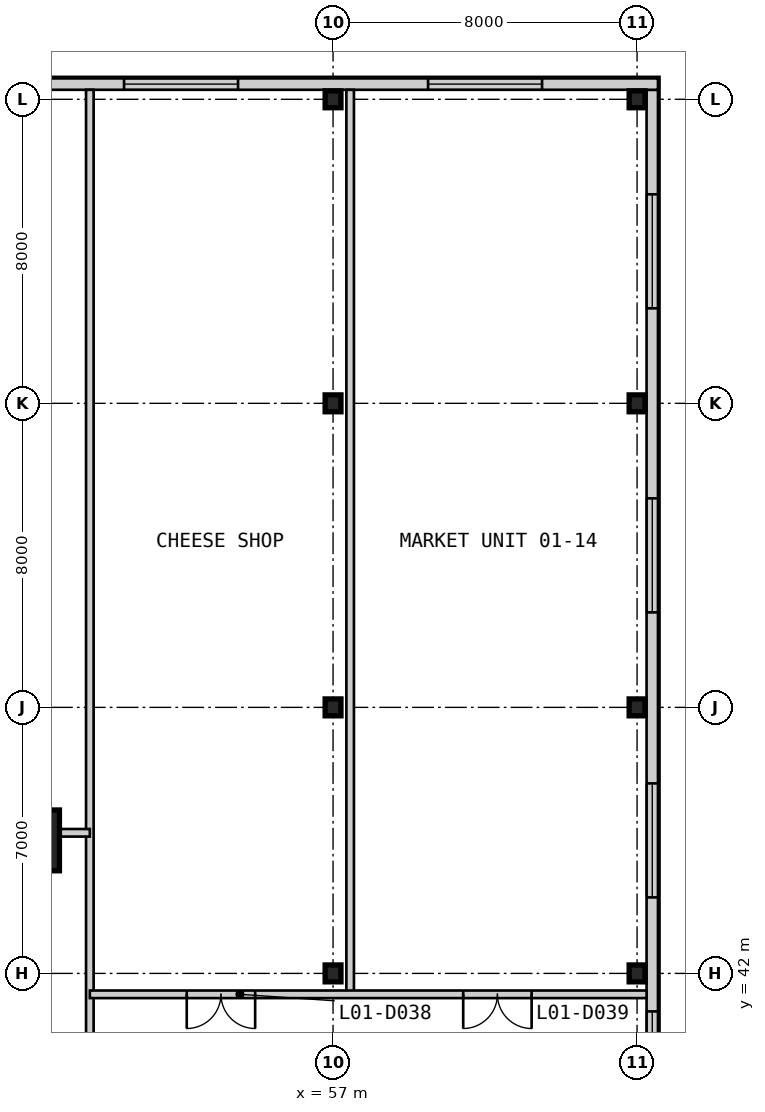
"""IFC4 building model, lengths in metres.
Left out: names, types, materials, properties, quantities, classifications, styles, units other than length and angle.
Written with IfcOpenShell. Run it as: python <this file> out.ifc"""

import sys

from ifc_helpers import new_model, si_unit, direction, frame, frame_2d, origin, origin_2d, place, context, subcontext, project, spatial, rectangle, i_section, extrude, element, fill, save


model = new_model("IFC4")
c1 = context("Model", 3, precision=1e-05, world=origin(), true_north=direction((0.0, 1.0)))
c2 = subcontext(c1, "Body", "Model", "MODEL_VIEW")
j1 = project(units=[si_unit("LENGTHUNIT", "METRE"), si_unit("PLANEANGLEUNIT", "RADIAN")], contexts=[c1])
p1 = place(None, origin())
s1 = spatial("IfcSite", under=j1, at=p1, CompositionType="ELEMENT")
p2 = place(p1, origin())
s2 = spatial("IfcBuilding", under=s1, at=p2, CompositionType="ELEMENT")
p3 = place(p2, frame((0.0, 0.0, 7.0)))
s3 = spatial("IfcBuildingStorey", under=s2, at=p3, CompositionType="ELEMENT", Elevation=7.0)
p4 = place(p3, frame((49.0, 45.5, 0.0), z_axis=(0.0, 0.0, 1.0), x_axis=(1.0, 0.0, 0.0)))
e1 = element("IfcColumn", 1, at=p4, inside=s3, PredefinedType="COLUMN", context=c2, shape_type="SweptSolid", body=[
    extrude(rectangle(XDim=1.6, YDim=1.6, at=origin_2d()), origin(), (0.0, 0.0, 1.0), 4.8),
])
for number, where, z_axis, x_axis in (
    (2, (57.0, 42.0, 0.0), (0.0, 0.0, 1.0), (1.0, 0.0, 0.0)),
    (3, (57.0, 49.0, 0.0), (0.0, 0.0, 1.0), (1.0, 0.0, 0.0)),
    (4, (57.0, 57.0, 0.0), (0.0, 0.0, 1.0), (1.0, 0.0, 0.0)),
    (5, (57.0, 65.0, 0.0), (0.0, 0.0, 1.0), (1.0, 0.0, 0.0)),
    (6, (65.0, 42.0, 0.0), (0.0, 0.0, 1.0), (1.0, 0.0, 0.0)),
    (7, (65.0, 49.0, 0.0), (0.0, 0.0, 1.0), (1.0, 0.0, 0.0)),
    (8, (65.0, 57.0, 0.0), (0.0, 0.0, 1.0), (1.0, 0.0, 0.0)),
    (9, (65.0, 65.0, 0.0), (0.0, 0.0, 1.0), (1.0, 0.0, 0.0)),
):
    element("IfcColumn", number, at=place(p3, frame(where, z_axis=z_axis, x_axis=x_axis)), inside=s3, PredefinedType="COLUMN", context=c2, shape_type="SweptSolid", body=[
        extrude(i_section(OverallWidth=0.417, OverallDepth=0.445, WebThickness=0.039, FlangeThickness=0.063, at=origin_2d()), origin(), (0.0, 0.0, 1.0), 4.8),
    ])
p5 = place(p3, frame((65.4, -15.25, 0.0), z_axis=(0.0, 0.0, 1.0), x_axis=(0.0, 1.0, 0.0)))
e10 = element("IfcWall", 10, at=p5, inside=s3, PredefinedType="SOLIDWALL", context=c2, shape_type="SweptSolid", body=[
    extrude(rectangle(XDim=80.5, YDim=0.3, at=frame_2d((40.25, 0.0))), origin(), (0.0, 0.0, 1.0), 4.5),
])
p6 = place(p5, frame((2.75, 0.0, 0.9)))
e11 = element("IfcOpeningElement", 11, at=p6, cuts=e10, PredefinedType="OPENING", context=c2, shape_type="SweptSolid", body=[
    extrude(rectangle(XDim=3.0, YDim=2.4, at=frame_2d((1.5, 1.2))), frame((0.0, 0.16, 0.0), z_axis=(0.0, -1.0, 0.0), x_axis=(1.0, 0.0, 0.0)), (0.0, 0.0, 1.0), 0.32),
])
p7 = place(p5, frame((10.75, 0.0, 0.9)))
e12 = element("IfcOpeningElement", 12, at=p7, cuts=e10, PredefinedType="OPENING", context=c2, shape_type="SweptSolid", body=[
    extrude(rectangle(XDim=3.0, YDim=2.4, at=frame_2d((1.5, 1.2))), frame((0.0, 0.16, 0.0), z_axis=(0.0, -1.0, 0.0), x_axis=(1.0, 0.0, 0.0)), (0.0, 0.0, 1.0), 0.32),
])
p8 = place(p5, frame((18.75, 0.0, 0.9)))
e13 = element("IfcOpeningElement", 13, at=p8, cuts=e10, PredefinedType="OPENING", context=c2, shape_type="SweptSolid", body=[
    extrude(rectangle(XDim=3.0, YDim=2.4, at=frame_2d((1.5, 1.2))), frame((0.0, 0.16, 0.0), z_axis=(0.0, -1.0, 0.0), x_axis=(1.0, 0.0, 0.0)), (0.0, 0.0, 1.0), 0.32),
])
p9 = place(p5, frame((32.75, 0.0, 0.9)))
e14 = element("IfcOpeningElement", 14, at=p9, cuts=e10, PredefinedType="OPENING", context=c2, shape_type="SweptSolid", body=[
    extrude(rectangle(XDim=3.0, YDim=2.4, at=frame_2d((1.5, 1.2))), frame((0.0, 0.16, 0.0), z_axis=(0.0, -1.0, 0.0), x_axis=(1.0, 0.0, 0.0)), (0.0, 0.0, 1.0), 0.32),
])
p10 = place(p5, frame((44.75, 0.0, 0.9)))
e15 = element("IfcOpeningElement", 15, at=p10, cuts=e10, PredefinedType="OPENING", context=c2, shape_type="SweptSolid", body=[
    extrude(rectangle(XDim=3.0, YDim=2.4, at=frame_2d((1.5, 1.2))), frame((0.0, 0.16, 0.0), z_axis=(0.0, -1.0, 0.0), x_axis=(1.0, 0.0, 0.0)), (0.0, 0.0, 1.0), 0.32),
])
p11 = place(p5, frame((53.25, 0.0, 0.9)))
e16 = element("IfcOpeningElement", 16, at=p11, cuts=e10, PredefinedType="OPENING", context=c2, shape_type="SweptSolid", body=[
    extrude(rectangle(XDim=3.0, YDim=2.4, at=frame_2d((1.5, 1.2))), frame((0.0, 0.16, 0.0), z_axis=(0.0, -1.0, 0.0), x_axis=(1.0, 0.0, 0.0)), (0.0, 0.0, 1.0), 0.32),
])
p12 = place(p5, frame((59.25, 0.0, 0.9)))
e17 = element("IfcOpeningElement", 17, at=p12, cuts=e10, PredefinedType="OPENING", context=c2, shape_type="SweptSolid", body=[
    extrude(rectangle(XDim=3.0, YDim=2.4, at=frame_2d((1.5, 1.2))), frame((0.0, 0.16, 0.0), z_axis=(0.0, -1.0, 0.0), x_axis=(1.0, 0.0, 0.0)), (0.0, 0.0, 1.0), 0.32),
])
p13 = place(p5, frame((66.75, 0.0, 0.9)))
e18 = element("IfcOpeningElement", 18, at=p13, cuts=e10, PredefinedType="OPENING", context=c2, shape_type="SweptSolid", body=[
    extrude(rectangle(XDim=3.0, YDim=2.4, at=frame_2d((1.5, 1.2))), frame((0.0, 0.16, 0.0), z_axis=(0.0, -1.0, 0.0), x_axis=(1.0, 0.0, 0.0)), (0.0, 0.0, 1.0), 0.32),
])
p14 = place(p5, frame((74.75, 0.0, 0.9)))
e19 = element("IfcOpeningElement", 19, at=p14, cuts=e10, PredefinedType="OPENING", context=c2, shape_type="SweptSolid", body=[
    extrude(rectangle(XDim=3.0, YDim=2.4, at=frame_2d((1.5, 1.2))), frame((0.0, 0.16, 0.0), z_axis=(0.0, -1.0, 0.0), x_axis=(1.0, 0.0, 0.0)), (0.0, 0.0, 1.0), 0.32),
])
p15 = place(p3, frame((65.55, 65.4, 0.0), z_axis=(0.0, 0.0, 1.0), x_axis=(-1.0, 0.0, 0.0)))
e20 = element("IfcWall", 20, at=p15, inside=s3, PredefinedType="SOLIDWALL", context=c2, shape_type="SweptSolid", body=[
    extrude(rectangle(XDim=81.1, YDim=0.3, at=frame_2d((40.55, 0.0))), origin(), (0.0, 0.0, 1.0), 4.5),
])
p16 = place(p15, frame((75.05, 0.0, 0.9)))
e21 = element("IfcOpeningElement", 21, at=p16, cuts=e20, PredefinedType="OPENING", context=c2, shape_type="SweptSolid", body=[
    extrude(rectangle(XDim=3.0, YDim=2.4, at=frame_2d((1.5, 1.2))), frame((0.0, 0.16, 0.0), z_axis=(0.0, -1.0, 0.0), x_axis=(1.0, 0.0, 0.0)), (0.0, 0.0, 1.0), 0.32),
])
p17 = place(p15, frame((67.05, 0.0, 0.9)))
e22 = element("IfcOpeningElement", 22, at=p17, cuts=e20, PredefinedType="OPENING", context=c2, shape_type="SweptSolid", body=[
    extrude(rectangle(XDim=3.0, YDim=2.4, at=frame_2d((1.5, 1.2))), frame((0.0, 0.16, 0.0), z_axis=(0.0, -1.0, 0.0), x_axis=(1.0, 0.0, 0.0)), (0.0, 0.0, 1.0), 0.32),
])
p18 = place(p15, frame((59.05, 0.0, 0.9)))
e23 = element("IfcOpeningElement", 23, at=p18, cuts=e20, PredefinedType="OPENING", context=c2, shape_type="SweptSolid", body=[
    extrude(rectangle(XDim=3.0, YDim=2.4, at=frame_2d((1.5, 1.2))), frame((0.0, 0.16, 0.0), z_axis=(0.0, -1.0, 0.0), x_axis=(1.0, 0.0, 0.0)), (0.0, 0.0, 1.0), 0.32),
])
p19 = place(p15, frame((45.05, 0.0, 0.9)))
e24 = element("IfcOpeningElement", 24, at=p19, cuts=e20, PredefinedType="OPENING", context=c2, shape_type="SweptSolid", body=[
    extrude(rectangle(XDim=3.0, YDim=2.4, at=frame_2d((1.5, 1.2))), frame((0.0, 0.16, 0.0), z_axis=(0.0, -1.0, 0.0), x_axis=(1.0, 0.0, 0.0)), (0.0, 0.0, 1.0), 0.32),
])
p20 = place(p15, frame((33.05, 0.0, 0.9)))
e25 = element("IfcOpeningElement", 25, at=p20, cuts=e20, PredefinedType="OPENING", context=c2, shape_type="SweptSolid", body=[
    extrude(rectangle(XDim=3.0, YDim=2.4, at=frame_2d((1.5, 1.2))), frame((0.0, 0.16, 0.0), z_axis=(0.0, -1.0, 0.0), x_axis=(1.0, 0.0, 0.0)), (0.0, 0.0, 1.0), 0.32),
])
p21 = place(p15, frame((24.55, 0.0, 0.9)))
e26 = element("IfcOpeningElement", 26, at=p21, cuts=e20, PredefinedType="OPENING", context=c2, shape_type="SweptSolid", body=[
    extrude(rectangle(XDim=3.0, YDim=2.4, at=frame_2d((1.5, 1.2))), frame((0.0, 0.16, 0.0), z_axis=(0.0, -1.0, 0.0), x_axis=(1.0, 0.0, 0.0)), (0.0, 0.0, 1.0), 0.32),
])
p22 = place(p15, frame((18.55, 0.0, 0.9)))
e27 = element("IfcOpeningElement", 27, at=p22, cuts=e20, PredefinedType="OPENING", context=c2, shape_type="SweptSolid", body=[
    extrude(rectangle(XDim=3.0, YDim=2.4, at=frame_2d((1.5, 1.2))), frame((0.0, 0.16, 0.0), z_axis=(0.0, -1.0, 0.0), x_axis=(1.0, 0.0, 0.0)), (0.0, 0.0, 1.0), 0.32),
])
p23 = place(p15, frame((11.05, 0.0, 0.9)))
e28 = element("IfcOpeningElement", 28, at=p23, cuts=e20, PredefinedType="OPENING", context=c2, shape_type="SweptSolid", body=[
    extrude(rectangle(XDim=3.0, YDim=2.4, at=frame_2d((1.5, 1.2))), frame((0.0, 0.16, 0.0), z_axis=(0.0, -1.0, 0.0), x_axis=(1.0, 0.0, 0.0)), (0.0, 0.0, 1.0), 0.32),
])
p24 = place(p15, frame((3.05, 0.0, 0.9)))
e29 = element("IfcOpeningElement", 29, at=p24, cuts=e20, PredefinedType="OPENING", context=c2, shape_type="SweptSolid", body=[
    extrude(rectangle(XDim=3.0, YDim=2.4, at=frame_2d((1.5, 1.2))), frame((0.0, 0.16, 0.0), z_axis=(0.0, -1.0, 0.0), x_axis=(1.0, 0.0, 0.0)), (0.0, 0.0, 1.0), 0.32),
])
p25 = place(p3, frame((50.6, 38.4, 0.0), z_axis=(0.0, 0.0, 1.0), x_axis=(0.0, 1.0, 0.0)))
e30 = element("IfcWall", 30, at=p25, inside=s3, PredefinedType="PARTITIONING", context=c2, shape_type="SweptSolid", body=[
    extrude(rectangle(XDim=26.85, YDim=0.2, at=frame_2d((13.425, 0.0))), origin(), (0.0, 0.0, 1.0), 4.5),
])
p26 = place(p3, frame((57.45, 41.45, 0.0), z_axis=(0.0, 0.0, 1.0), x_axis=(0.0, 1.0, 0.0)))
e31 = element("IfcWall", 31, at=p26, inside=s3, PredefinedType="PARTITIONING", context=c2, shape_type="SweptSolid", body=[
    extrude(rectangle(XDim=23.8, YDim=0.2, at=frame_2d((11.9, 0.0))), origin(), (0.0, 0.0, 1.0), 4.5),
])
p27 = place(p3, frame((50.6, 41.45, 0.0), z_axis=(0.0, 0.0, 1.0), x_axis=(1.0, 0.0, 0.0)))
e32 = element("IfcWall", 32, at=p27, inside=s3, PredefinedType="PARTITIONING", context=c2, shape_type="SweptSolid", body=[
    extrude(rectangle(XDim=14.65, YDim=0.2, at=frame_2d((7.325, 0.0))), origin(), (0.0, 0.0, 1.0), 4.5),
])
p28 = place(p27, frame((2.55, 0.0, 0.0)))
e33 = element("IfcOpeningElement", 33, at=p28, cuts=e32, PredefinedType="OPENING", context=c2, shape_type="SweptSolid", body=[
    extrude(rectangle(XDim=1.8, YDim=2.4, at=frame_2d((0.9, 1.2))), frame((0.0, 0.11, 0.0), z_axis=(0.0, -1.0, 0.0), x_axis=(1.0, 0.0, 0.0)), (0.0, 0.0, 1.0), 0.22),
])
p29 = place(p27, frame((9.825, 0.0, 0.0)))
e34 = element("IfcOpeningElement", 34, at=p29, cuts=e32, PredefinedType="OPENING", context=c2, shape_type="SweptSolid", body=[
    extrude(rectangle(XDim=1.8, YDim=2.4, at=frame_2d((0.9, 1.2))), frame((0.0, 0.11, 0.0), z_axis=(0.0, -1.0, 0.0), x_axis=(1.0, 0.0, 0.0)), (0.0, 0.0, 1.0), 0.22),
])
p30 = place(p3, frame((49.8, 45.7, 0.0), z_axis=(0.0, 0.0, 1.0), x_axis=(1.0, 0.0, 0.0)))
e35 = element("IfcWall", 35, at=p30, inside=s3, PredefinedType="PARTITIONING", context=c2, shape_type="SweptSolid", body=[
    extrude(rectangle(XDim=0.8, YDim=0.2, at=frame_2d((0.4, 0.0))), origin(), (0.0, 0.0, 1.0), 4.5),
])
p31 = place(p11, origin())
e36 = element("IfcWindow", 36, at=p31, inside=s3, PartitioningType="SINGLE_PANEL", PredefinedType="WINDOW", context=c2, shape_type="SweptSolid", body=[
    extrude(rectangle(XDim=3.0, YDim=2.4, at=frame_2d((1.5, 1.2))), frame((0.0, 0.03, 0.0), z_axis=(0.0, -1.0, 0.0), x_axis=(1.0, 0.0, 0.0)), (0.0, 0.0, 1.0), 0.06),
])
fill(e16, e36)
p32 = place(p12, origin())
e37 = element("IfcWindow", 37, at=p32, inside=s3, PartitioningType="SINGLE_PANEL", PredefinedType="WINDOW", context=c2, shape_type="SweptSolid", body=[
    extrude(rectangle(XDim=3.0, YDim=2.4, at=frame_2d((1.5, 1.2))), frame((0.0, 0.03, 0.0), z_axis=(0.0, -1.0, 0.0), x_axis=(1.0, 0.0, 0.0)), (0.0, 0.0, 1.0), 0.06),
])
fill(e17, e37)
p33 = place(p13, origin())
e38 = element("IfcWindow", 38, at=p33, inside=s3, PartitioningType="SINGLE_PANEL", PredefinedType="WINDOW", context=c2, shape_type="SweptSolid", body=[
    extrude(rectangle(XDim=3.0, YDim=2.4, at=frame_2d((1.5, 1.2))), frame((0.0, 0.03, 0.0), z_axis=(0.0, -1.0, 0.0), x_axis=(1.0, 0.0, 0.0)), (0.0, 0.0, 1.0), 0.06),
])
fill(e18, e38)
p34 = place(p14, origin())
e39 = element("IfcWindow", 39, at=p34, inside=s3, PartitioningType="SINGLE_PANEL", PredefinedType="WINDOW", context=c2, shape_type="SweptSolid", body=[
    extrude(rectangle(XDim=3.0, YDim=2.4, at=frame_2d((1.5, 1.2))), frame((0.0, 0.03, 0.0), z_axis=(0.0, -1.0, 0.0), x_axis=(1.0, 0.0, 0.0)), (0.0, 0.0, 1.0), 0.06),
])
fill(e19, e39)
p35 = place(p23, origin())
e40 = element("IfcWindow", 40, at=p35, inside=s3, PartitioningType="SINGLE_PANEL", PredefinedType="WINDOW", context=c2, shape_type="SweptSolid", body=[
    extrude(rectangle(XDim=3.0, YDim=2.4, at=frame_2d((1.5, 1.2))), frame((0.0, 0.03, 0.0), z_axis=(0.0, -1.0, 0.0), x_axis=(1.0, 0.0, 0.0)), (0.0, 0.0, 1.0), 0.06),
])
fill(e28, e40)
p36 = place(p24, origin())
e41 = element("IfcWindow", 41, at=p36, inside=s3, PartitioningType="SINGLE_PANEL", PredefinedType="WINDOW", context=c2, shape_type="SweptSolid", body=[
    extrude(rectangle(XDim=3.0, YDim=2.4, at=frame_2d((1.5, 1.2))), frame((0.0, 0.03, 0.0), z_axis=(0.0, -1.0, 0.0), x_axis=(1.0, 0.0, 0.0)), (0.0, 0.0, 1.0), 0.06),
])
fill(e29, e41)
p37 = place(p28, frame((1.8, 0.0, 0.0), z_axis=(0.0, 0.0, 1.0), x_axis=(-1.0, 0.0, 0.0)))
e42 = element("IfcDoor", 42, at=p37, inside=s3, OperationType="DOUBLE_DOOR_SINGLE_SWING", PredefinedType="DOOR", context=c2, shape_type="SweptSolid", body=[
    extrude(rectangle(XDim=1.8, YDim=2.4, at=frame_2d((0.9, 1.2))), frame((0.0, 0.025, 0.0), z_axis=(0.0, -1.0, 0.0), x_axis=(1.0, 0.0, 0.0)), (0.0, 0.0, 1.0), 0.05),
])
fill(e33, e42)
p38 = place(p29, frame((1.8, 0.0, 0.0), z_axis=(0.0, 0.0, 1.0), x_axis=(-1.0, 0.0, 0.0)))
e43 = element("IfcDoor", 43, at=p38, inside=s3, OperationType="DOUBLE_DOOR_SINGLE_SWING", PredefinedType="DOOR", context=c2, shape_type="SweptSolid", body=[
    extrude(rectangle(XDim=1.8, YDim=2.4, at=frame_2d((0.9, 1.2))), frame((0.0, 0.025, 0.0), z_axis=(0.0, -1.0, 0.0), x_axis=(1.0, 0.0, 0.0)), (0.0, 0.0, 1.0), 0.05),
])
fill(e34, e43)
save(model, sys.argv[1])
